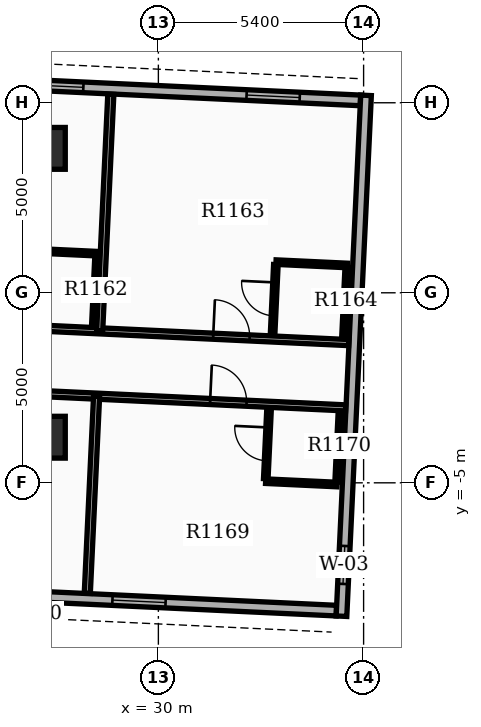
"""IFC4 building model, lengths in metres.
Left out: names, types, materials, properties, quantities, classifications, styles, units other than length and angle.
Written with IfcOpenShell. Run it as: python <this file> out.ifc"""

import sys

from ifc_helpers import new_model, si_unit, direction, frame, frame_2d, origin, origin_2d, place, context, subcontext, project, spatial, rectangle, extrude, element, fill, save


model = new_model("IFC4")
c1 = context("Model", 3, precision=1e-05, world=origin(), true_north=direction((0.0, 1.0)))
c2 = subcontext(c1, "Body", "Model", "MODEL_VIEW")
j1 = project(units=[si_unit("LENGTHUNIT", "METRE"), si_unit("PLANEANGLEUNIT", "RADIAN")], contexts=[c1])
p1 = place(None, origin())
s1 = spatial("IfcSite", under=j1, at=p1, CompositionType="ELEMENT")
p2 = place(p1, origin())
s2 = spatial("IfcBuilding", under=s1, at=p2, CompositionType="ELEMENT")
p3 = place(p2, frame((0.0, 0.0, 75.6)))
s3 = spatial("IfcBuildingStorey", under=s2, at=p3, CompositionType="ELEMENT", Elevation=75.6)
for number, where, z_axis, x_axis in (
    (1, (27.0, -3.8, 0.0), (0.0, 0.0, 1.0), (1.0, 0.0, 0.0)),
    (2, (27.0, 3.8, 0.0), (0.0, 0.0, 1.0), (1.0, 0.0, 0.0)),
):
    element("IfcColumn", number, at=place(p3, frame(where, z_axis=z_axis, x_axis=x_axis)), inside=s3, PredefinedType="COLUMN", context=c2, shape_type="SweptSolid", body=[
        extrude(rectangle(XDim=1.1, YDim=1.1, at=origin_2d()), origin(), (0.0, 0.0, 1.0), 3.9),
    ])
p4 = place(p3, frame((14.607, -7.416, 0.0), z_axis=(0.0, 0.0, 1.0), x_axis=(0.998890015344, -0.047103473814, 0.0)))
e3 = element("IfcWall", 3, at=p4, inside=s3, PredefinedType="STANDARD", context=c2, shape_type="SweptSolid", body=[
    extrude(rectangle(XDim=20.1, YDim=0.28, at=frame_2d((10.05, 0.0))), origin(), (0.0, 0.0, 1.0), 2.91),
])
p5 = place(p4, frame((1.6, 0.0, 0.8)))
e4 = element("IfcOpeningElement", 4, at=p5, cuts=e3, PredefinedType="OPENING", context=c2, shape_type="SweptSolid", body=[
    extrude(rectangle(XDim=1.4, YDim=1.6, at=frame_2d((0.7, 0.8))), frame((0.0, 0.15, 0.0), z_axis=(0.0, -1.0, 0.0), x_axis=(1.0, 0.0, 0.0)), (0.0, 0.0, 1.0), 0.3),
])
p6 = place(p4, frame((7.05, 0.0, 0.8)))
e5 = element("IfcOpeningElement", 5, at=p6, cuts=e3, PredefinedType="OPENING", context=c2, shape_type="SweptSolid", body=[
    extrude(rectangle(XDim=1.4, YDim=1.6, at=frame_2d((0.7, 0.8))), frame((0.0, 0.15, 0.0), z_axis=(0.0, -1.0, 0.0), x_axis=(1.0, 0.0, 0.0)), (0.0, 0.0, 1.0), 0.3),
])
p7 = place(p4, frame((10.25, 0.0, 0.8)))
e6 = element("IfcOpeningElement", 6, at=p7, cuts=e3, PredefinedType="OPENING", context=c2, shape_type="SweptSolid", body=[
    extrude(rectangle(XDim=1.4, YDim=1.6, at=frame_2d((0.7, 0.8))), frame((0.0, 0.15, 0.0), z_axis=(0.0, -1.0, 0.0), x_axis=(1.0, 0.0, 0.0)), (0.0, 0.0, 1.0), 0.3),
])
p8 = place(p4, frame((14.2, 0.0, 0.8)))
e7 = element("IfcOpeningElement", 7, at=p8, cuts=e3, PredefinedType="OPENING", context=c2, shape_type="SweptSolid", body=[
    extrude(rectangle(XDim=1.4, YDim=1.6, at=frame_2d((0.7, 0.8))), frame((0.0, 0.15, 0.0), z_axis=(0.0, -1.0, 0.0), x_axis=(1.0, 0.0, 0.0)), (0.0, 0.0, 1.0), 0.3),
])
p9 = place(p3, frame((35.318, 5.062, 0.0), z_axis=(0.0, 0.0, 1.0), x_axis=(-0.998890015344, 0.047103473814, 0.0)))
e8 = element("IfcWall", 8, at=p9, inside=s3, PredefinedType="STANDARD", context=c2, shape_type="SweptSolid", body=[
    extrude(rectangle(XDim=20.1, YDim=0.28, at=frame_2d((10.05, 0.0))), origin(), (0.0, 0.0, 1.0), 2.91),
])
p10 = place(p9, frame((1.6, 0.0, 0.8)))
e9 = element("IfcOpeningElement", 9, at=p10, cuts=e8, PredefinedType="OPENING", context=c2, shape_type="SweptSolid", body=[
    extrude(rectangle(XDim=1.4, YDim=1.6, at=frame_2d((0.7, 0.8))), frame((0.0, 0.15, 0.0), z_axis=(0.0, -1.0, 0.0), x_axis=(1.0, 0.0, 0.0)), (0.0, 0.0, 1.0), 0.3),
])
p11 = place(p9, frame((7.3, 0.0, 0.8)))
e10 = element("IfcOpeningElement", 10, at=p11, cuts=e8, PredefinedType="OPENING", context=c2, shape_type="SweptSolid", body=[
    extrude(rectangle(XDim=1.4, YDim=1.6, at=frame_2d((0.7, 0.8))), frame((0.0, 0.15, 0.0), z_axis=(0.0, -1.0, 0.0), x_axis=(1.0, 0.0, 0.0)), (0.0, 0.0, 1.0), 0.3),
])
p12 = place(p9, frame((10.5, 0.0, 0.8)))
e11 = element("IfcOpeningElement", 11, at=p12, cuts=e8, PredefinedType="OPENING", context=c2, shape_type="SweptSolid", body=[
    extrude(rectangle(XDim=1.4, YDim=1.6, at=frame_2d((0.7, 0.8))), frame((0.0, 0.15, 0.0), z_axis=(0.0, -1.0, 0.0), x_axis=(1.0, 0.0, 0.0)), (0.0, 0.0, 1.0), 0.3),
])
p13 = place(p9, frame((15.75, 0.0, 0.0)))
e12 = element("IfcOpeningElement", 12, at=p13, cuts=e8, PredefinedType="OPENING", context=c2, shape_type="SweptSolid", body=[
    extrude(rectangle(XDim=0.96, YDim=2.1, at=frame_2d((0.48, 1.05))), frame((0.0, 0.15, 0.0), z_axis=(0.0, -1.0, 0.0), x_axis=(1.0, 0.0, 0.0)), (0.0, 0.0, 1.0), 0.3),
])
p14 = place(p3, frame((34.818, -8.51, 0.0), z_axis=(0.0, 0.0, 1.0), x_axis=(0.047101845086, 0.998890092147, 0.0)))
e13 = element("IfcWall", 13, at=p14, inside=s3, PredefinedType="STANDARD", context=c2, shape_type="SweptSolid", body=[
    extrude(rectangle(XDim=13.72, YDim=0.28, at=frame_2d((6.86, 0.0))), origin(), (0.0, 0.0, 1.0), 2.91),
])
p15 = place(p14, frame((0.85, 0.0, 0.85)))
e14 = element("IfcOpeningElement", 14, at=p15, cuts=e13, PredefinedType="OPENING", context=c2, shape_type="SweptSolid", body=[
    extrude(rectangle(XDim=1.0, YDim=1.5, at=frame_2d((0.5, 0.75))), frame((0.0, 0.15, 0.0), z_axis=(0.0, -1.0, 0.0), x_axis=(1.0, 0.0, 0.0)), (0.0, 0.0, 1.0), 0.3),
])
p16 = place(p3, frame((14.85, -0.36, 0.0), z_axis=(0.0, 0.0, 1.0), x_axis=(0.998889899911, -0.047105921672, 0.0)))
e15 = element("IfcWall", 15, at=p16, inside=s3, PredefinedType="PARTITIONING", context=c2, shape_type="SweptSolid", body=[
    extrude(rectangle(XDim=20.182, YDim=0.16, at=frame_2d((10.091, 0.0))), origin(), (0.0, 0.0, 1.0), 2.9),
])
p17 = place(p16, frame((0.45, 0.0, 0.0)))
e16 = element("IfcOpeningElement", 16, at=p17, cuts=e15, PredefinedType="OPENING", context=c2, shape_type="SweptSolid", body=[
    extrude(rectangle(XDim=0.96, YDim=2.15, at=frame_2d((0.48, 1.075))), frame((0.0, 0.09, 0.0), z_axis=(0.0, -1.0, 0.0), x_axis=(1.0, 0.0, 0.0)), (0.0, 0.0, 1.0), 0.18),
])
p18 = place(p16, frame((7.896, 0.0, 0.0)))
e17 = element("IfcOpeningElement", 17, at=p18, cuts=e15, PredefinedType="OPENING", context=c2, shape_type="SweptSolid", body=[
    extrude(rectangle(XDim=0.96, YDim=2.15, at=frame_2d((0.48, 1.075))), frame((0.0, 0.09, 0.0), z_axis=(0.0, -1.0, 0.0), x_axis=(1.0, 0.0, 0.0)), (0.0, 0.0, 1.0), 0.18),
])
p19 = place(p16, frame((16.611, 0.0, 0.0)))
e18 = element("IfcOpeningElement", 18, at=p19, cuts=e15, PredefinedType="OPENING", context=c2, shape_type="SweptSolid", body=[
    extrude(rectangle(XDim=0.96, YDim=2.15, at=frame_2d((0.48, 1.075))), frame((0.0, 0.09, 0.0), z_axis=(0.0, -1.0, 0.0), x_axis=(1.0, 0.0, 0.0)), (0.0, 0.0, 1.0), 0.18),
])
p20 = place(p3, frame((28.455, -1.001, 0.0), z_axis=(0.0, 0.0, 1.0), x_axis=(0.047090502161, 0.998890626949, 0.0)))
e19 = element("IfcWall", 19, at=p20, inside=s3, PredefinedType="PARTITIONING", context=c2, shape_type="SweptSolid", body=[
    extrude(rectangle(XDim=6.232, YDim=0.16, at=frame_2d((3.116, 0.0))), origin(), (0.0, 0.0, 1.0), 2.9),
])
p21 = place(p3, frame((28.302, -0.854, 0.0), z_axis=(0.0, 0.0, 1.0), x_axis=(0.047080807099, 0.998891083954, 0.0)))
e20 = element("IfcWall", 20, at=p21, inside=s3, PredefinedType="PARTITIONING", context=c2, shape_type="SweptSolid", body=[
    extrude(rectangle(XDim=1.82, YDim=0.12, at=frame_2d((0.91, 0.0))), origin(), (0.0, 0.0, 1.0), 2.9),
])
p22 = place(p3, frame((26.513, 1.117, 0.0), z_axis=(0.0, 0.0, 1.0), x_axis=(0.998894425757, -0.04700985207, 0.0)))
e21 = element("IfcWall", 21, at=p22, inside=s3, PredefinedType="PARTITIONING", context=c2, shape_type="SweptSolid", body=[
    extrude(rectangle(XDim=1.88, YDim=0.12, at=frame_2d((0.94, 0.0))), origin(), (0.0, 0.0, 1.0), 2.9),
])
p23 = place(p3, frame((33.006, -1.076, 0.0), z_axis=(0.0, 0.0, 1.0), x_axis=(0.047087116047, 0.998890786574, 0.0)))
e22 = element("IfcWall", 22, at=p23, inside=s3, PredefinedType="PARTITIONING", context=c2, shape_type="SweptSolid", body=[
    extrude(rectangle(XDim=1.82, YDim=0.12, at=frame_2d((0.91, 0.0))), origin(), (0.0, 0.0, 1.0), 2.9),
])
p24 = place(p23, frame((0.47, 0.0, 0.0)))
e23 = element("IfcOpeningElement", 23, at=p24, cuts=e22, PredefinedType="OPENING", context=c2, shape_type="SweptSolid", body=[
    extrude(rectangle(XDim=0.88, YDim=2.1, at=frame_2d((0.44, 1.05))), frame((0.0, 0.07, 0.0), z_axis=(0.0, -1.0, 0.0), x_axis=(1.0, 0.0, 0.0)), (0.0, 0.0, 1.0), 0.14),
])
p25 = place(p3, frame((34.884, -1.165, 0.0), z_axis=(0.0, 0.0, 1.0), x_axis=(0.047087116047, 0.998890786574, 0.0)))
e24 = element("IfcWall", 24, at=p25, inside=s3, PredefinedType="PARTITIONING", context=c2, shape_type="SweptSolid", body=[
    extrude(rectangle(XDim=1.82, YDim=0.12, at=frame_2d((0.91, 0.0))), origin(), (0.0, 0.0, 1.0), 2.9),
])
p26 = place(p3, frame((33.095, 0.807, 0.0), z_axis=(0.0, 0.0, 1.0), x_axis=(0.998894425757, -0.04700985207, 0.0)))
e25 = element("IfcWall", 25, at=p26, inside=s3, PredefinedType="PARTITIONING", context=c2, shape_type="SweptSolid", body=[
    extrude(rectangle(XDim=1.88, YDim=0.12, at=frame_2d((0.94, 0.0))), origin(), (0.0, 0.0, 1.0), 2.9),
])
p27 = place(p3, frame((14.769, -2.078, 0.0), z_axis=(0.0, 0.0, 1.0), x_axis=(0.998889330628, -0.047117991871, 0.0)))
e26 = element("IfcWall", 26, at=p27, inside=s3, PredefinedType="PARTITIONING", context=c2, shape_type="SweptSolid", body=[
    extrude(rectangle(XDim=20.182, YDim=0.16, at=frame_2d((10.091, 0.0))), origin(), (0.0, 0.0, 1.0), 2.9),
])
p28 = place(p27, frame((2.636, 0.0, 0.0)))
e27 = element("IfcOpeningElement", 27, at=p28, cuts=e26, PredefinedType="OPENING", context=c2, shape_type="SweptSolid", body=[
    extrude(rectangle(XDim=0.96, YDim=2.15, at=frame_2d((0.48, 1.075))), frame((0.0, 0.09, 0.0), z_axis=(0.0, -1.0, 0.0), x_axis=(1.0, 0.0, 0.0)), (0.0, 0.0, 1.0), 0.18),
])
p29 = place(p27, frame((9.243, 0.0, 0.0)))
e28 = element("IfcOpeningElement", 28, at=p29, cuts=e26, PredefinedType="OPENING", context=c2, shape_type="SweptSolid", body=[
    extrude(rectangle(XDim=0.96, YDim=2.15, at=frame_2d((0.48, 1.075))), frame((0.0, 0.09, 0.0), z_axis=(0.0, -1.0, 0.0), x_axis=(1.0, 0.0, 0.0)), (0.0, 0.0, 1.0), 0.18),
])
p30 = place(p27, frame((16.611, 0.0, 0.0)))
e29 = element("IfcOpeningElement", 29, at=p30, cuts=e26, PredefinedType="OPENING", context=c2, shape_type="SweptSolid", body=[
    extrude(rectangle(XDim=0.96, YDim=2.15, at=frame_2d((0.48, 1.075))), frame((0.0, 0.09, 0.0), z_axis=(0.0, -1.0, 0.0), x_axis=(1.0, 0.0, 0.0)), (0.0, 0.0, 1.0), 0.18),
])
p31 = place(p3, frame((28.375, -2.719, 0.0), z_axis=(0.0, 0.0, 1.0), x_axis=(-0.047116094665, -0.998889420118, 0.0)))
e30 = element("IfcWall", 30, at=p31, inside=s3, PredefinedType="PARTITIONING", context=c2, shape_type="SweptSolid", body=[
    extrude(rectangle(XDim=5.192, YDim=0.16, at=frame_2d((2.596, 0.0))), origin(), (0.0, 0.0, 1.0), 2.9),
])
p32 = place(p3, frame((32.826, -4.892, 0.0), z_axis=(0.0, 0.0, 1.0), x_axis=(0.047087116047, 0.998890786574, 0.0)))
e31 = element("IfcWall", 31, at=p32, inside=s3, PredefinedType="PARTITIONING", context=c2, shape_type="SweptSolid", body=[
    extrude(rectangle(XDim=1.82, YDim=0.12, at=frame_2d((0.91, 0.0))), origin(), (0.0, 0.0, 1.0), 2.9),
])
p33 = place(p32, frame((0.47, 0.0, 0.0)))
e32 = element("IfcOpeningElement", 32, at=p33, cuts=e31, PredefinedType="OPENING", context=c2, shape_type="SweptSolid", body=[
    extrude(rectangle(XDim=0.88, YDim=2.1, at=frame_2d((0.44, 1.05))), frame((0.0, 0.07, 0.0), z_axis=(0.0, -1.0, 0.0), x_axis=(1.0, 0.0, 0.0)), (0.0, 0.0, 1.0), 0.14),
])
p34 = place(p3, frame((34.704, -4.98, 0.0), z_axis=(0.0, 0.0, 1.0), x_axis=(0.047220968666, 0.998884467853, 0.0)))
e33 = element("IfcWall", 33, at=p34, inside=s3, PredefinedType="PARTITIONING", context=c2, shape_type="SweptSolid", body=[
    extrude(rectangle(XDim=1.82, YDim=0.12, at=frame_2d((0.91, 0.0))), origin(), (0.0, 0.0, 1.0), 2.9),
])
p35 = place(p3, frame((32.823, -4.957, 0.0), z_axis=(0.0, 0.0, 1.0), x_axis=(0.998894425757, -0.04700985207, 0.0)))
e34 = element("IfcWall", 34, at=p35, inside=s3, PredefinedType="PARTITIONING", context=c2, shape_type="SweptSolid", body=[
    extrude(rectangle(XDim=1.88, YDim=0.12, at=frame_2d((0.94, 0.0))), origin(), (0.0, 0.0, 1.0), 2.9),
])
p36 = place(p8, origin())
e35 = element("IfcWindow", 35, at=p36, inside=s3, PartitioningType="SINGLE_PANEL", PredefinedType="WINDOW", context=c2, shape_type="SweptSolid", body=[
    extrude(rectangle(XDim=1.4, YDim=1.6, at=frame_2d((0.7, 0.8))), frame((0.0, 0.03, 0.0), z_axis=(0.0, -1.0, 0.0), x_axis=(1.0, 0.0, 0.0)), (0.0, 0.0, 1.0), 0.06),
])
fill(e7, e35)
p37 = place(p10, origin())
e36 = element("IfcWindow", 36, at=p37, inside=s3, PartitioningType="SINGLE_PANEL", PredefinedType="WINDOW", context=c2, shape_type="SweptSolid", body=[
    extrude(rectangle(XDim=1.4, YDim=1.6, at=frame_2d((0.7, 0.8))), frame((0.0, 0.03, 0.0), z_axis=(0.0, -1.0, 0.0), x_axis=(1.0, 0.0, 0.0)), (0.0, 0.0, 1.0), 0.06),
])
fill(e9, e36)
p38 = place(p11, origin())
e37 = element("IfcWindow", 37, at=p38, inside=s3, PartitioningType="SINGLE_PANEL", PredefinedType="WINDOW", context=c2, shape_type="SweptSolid", body=[
    extrude(rectangle(XDim=1.4, YDim=1.6, at=frame_2d((0.7, 0.8))), frame((0.0, 0.03, 0.0), z_axis=(0.0, -1.0, 0.0), x_axis=(1.0, 0.0, 0.0)), (0.0, 0.0, 1.0), 0.06),
])
fill(e10, e37)
p39 = place(p15, origin())
e38 = element("IfcWindow", 38, at=p39, inside=s3, PartitioningType="SINGLE_PANEL", PredefinedType="WINDOW", context=c2, shape_type="SweptSolid", body=[
    extrude(rectangle(XDim=1.0, YDim=1.5, at=frame_2d((0.5, 0.75))), frame((0.0, 0.03, 0.0), z_axis=(0.0, -1.0, 0.0), x_axis=(1.0, 0.0, 0.0)), (0.0, 0.0, 1.0), 0.06),
])
fill(e14, e38)
p40 = place(p19, origin())
e39 = element("IfcDoor", 39, at=p40, inside=s3, OperationType="SINGLE_SWING_LEFT", PredefinedType="DOOR", context=c2, shape_type="SweptSolid", body=[
    extrude(rectangle(XDim=0.96, YDim=2.15, at=frame_2d((0.48, 1.075))), frame((0.0, 0.025, 0.0), z_axis=(0.0, -1.0, 0.0), x_axis=(1.0, 0.0, 0.0)), (0.0, 0.0, 1.0), 0.05),
])
fill(e18, e39)
p41 = place(p24, origin())
e40 = element("IfcDoor", 40, at=p41, inside=s3, OperationType="SINGLE_SWING_RIGHT", PredefinedType="DOOR", context=c2, shape_type="SweptSolid", body=[
    extrude(rectangle(XDim=0.88, YDim=2.1, at=frame_2d((0.44, 1.05))), frame((0.0, 0.025, 0.0), z_axis=(0.0, -1.0, 0.0), x_axis=(1.0, 0.0, 0.0)), (0.0, 0.0, 1.0), 0.05),
])
fill(e23, e40)
p42 = place(p30, origin())
e41 = element("IfcDoor", 41, at=p42, inside=s3, OperationType="SINGLE_SWING_LEFT", PredefinedType="DOOR", context=c2, shape_type="SweptSolid", body=[
    extrude(rectangle(XDim=0.96, YDim=2.15, at=frame_2d((0.48, 1.075))), frame((0.0, 0.025, 0.0), z_axis=(0.0, -1.0, 0.0), x_axis=(1.0, 0.0, 0.0)), (0.0, 0.0, 1.0), 0.05),
])
fill(e29, e41)
p43 = place(p33, origin())
e42 = element("IfcDoor", 42, at=p43, inside=s3, OperationType="SINGLE_SWING_RIGHT", PredefinedType="DOOR", context=c2, shape_type="SweptSolid", body=[
    extrude(rectangle(XDim=0.88, YDim=2.1, at=frame_2d((0.44, 1.05))), frame((0.0, 0.025, 0.0), z_axis=(0.0, -1.0, 0.0), x_axis=(1.0, 0.0, 0.0)), (0.0, 0.0, 1.0), 0.05),
])
fill(e32, e42)
save(model, sys.argv[1])
